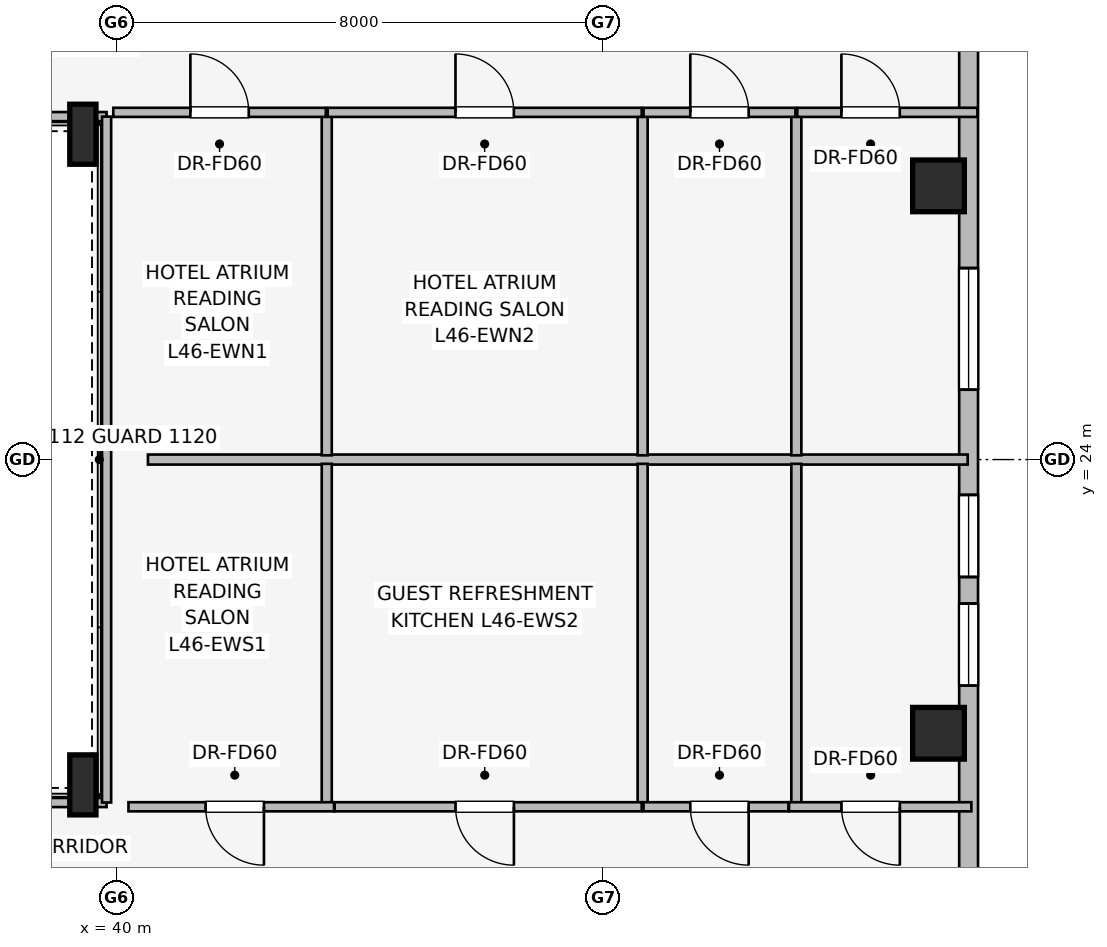
"""IFC4 building model, lengths in metres.
Left out: names, types, materials, properties, quantities, classifications, styles, units other than length and angle.
Written with IfcOpenShell. Run it as: python <this file> out.ifc"""

import sys

from ifc_helpers import new_model, si_unit, direction, frame, frame_2d, origin, origin_2d, place, context, subcontext, project, spatial, rectangle, i_section, extrude, element, fill, save


model = new_model("IFC4")
c1 = context("Model", 3, precision=1e-05, world=origin(), true_north=direction((0.0, 1.0)))
c2 = subcontext(c1, "Body", "Model", "MODEL_VIEW")
j1 = project(units=[si_unit("LENGTHUNIT", "METRE"), si_unit("PLANEANGLEUNIT", "RADIAN")], contexts=[c1])
p1 = place(None, origin())
s1 = spatial("IfcSite", under=j1, at=p1, CompositionType="ELEMENT")
p2 = place(p1, origin())
s2 = spatial("IfcBuilding", under=s1, at=p2, CompositionType="ELEMENT")
p3 = place(p2, frame((0.0, 0.0, 170.55)))
s3 = spatial("IfcBuildingStorey", under=s2, at=p3, CompositionType="ELEMENT", Elevation=170.55)
for number, where, z_axis, x_axis in (
    (1, (53.522, 19.499, 0.0), (0.0, 0.0, 1.0), (1.0, 0.0, 0.0)),
    (2, (53.522, 28.501, 0.0), (0.0, 0.0, 1.0), (1.0, 0.0, 0.0)),
):
    element("IfcColumn", number, at=place(p3, frame(where, z_axis=z_axis, x_axis=x_axis)), inside=s3, PredefinedType="COLUMN", context=c2, shape_type="SweptSolid", body=[
        extrude(rectangle(XDim=0.85, YDim=0.85, at=origin_2d()), origin(), (0.0, 0.0, 1.0), 3.45),
    ])
for number, where, z_axis, x_axis in (
    (3, (39.45, 18.65, 0.0), (0.0, 0.0, 1.0), (1.0, 0.0, 0.0)),
    (4, (39.45, 29.35, 0.0), (0.0, 0.0, 1.0), (1.0, 0.0, 0.0)),
):
    element("IfcColumn", number, at=place(p3, frame(where, z_axis=z_axis, x_axis=x_axis)), inside=s3, PredefinedType="COLUMN", context=c2, shape_type="SweptSolid", body=[
        extrude(i_section(OverallWidth=0.431, OverallDepth=0.987, WebThickness=0.034, FlangeThickness=0.062, at=origin_2d()), origin(), (0.0, 0.0, 1.0), 3.45),
    ])
p4 = place(p3, frame((54.017, 31.502, 0.0), z_axis=(0.0, 0.0, 1.0), x_axis=(0.0, -1.0, 0.0)))
e5 = element("IfcWall", 5, at=p4, inside=s3, PredefinedType="STANDARD", context=c2, shape_type="SweptSolid", body=[
    extrude(rectangle(XDim=15.004, YDim=0.31, at=frame_2d((7.502, 0.0))), origin(), (0.0, 0.0, 1.0), 3.16),
])
p5 = place(p4, frame((4.353, 0.0, 0.75)))
e6 = element("IfcOpeningElement", 6, at=p5, cuts=e5, PredefinedType="OPENING", context=c2, shape_type="SweptSolid", body=[
    extrude(rectangle(XDim=2.0, YDim=1.5, at=frame_2d((1.0, 0.75))), frame((0.0, 0.165, 0.0), z_axis=(0.0, -1.0, 0.0), x_axis=(1.0, 0.0, 0.0)), (0.0, 0.0, 1.0), 0.33),
])
p6 = place(p4, frame((8.083, 0.0, 0.75)))
e7 = element("IfcOpeningElement", 7, at=p6, cuts=e5, PredefinedType="OPENING", context=c2, shape_type="SweptSolid", body=[
    extrude(rectangle(XDim=1.35, YDim=1.45, at=frame_2d((0.675, 0.725))), frame((0.0, 0.165, 0.0), z_axis=(0.0, -1.0, 0.0), x_axis=(1.0, 0.0, 0.0)), (0.0, 0.0, 1.0), 0.33),
])
p7 = place(p4, frame((9.87, 0.0, 0.75)))
e8 = element("IfcOpeningElement", 8, at=p7, cuts=e5, PredefinedType="OPENING", context=c2, shape_type="SweptSolid", body=[
    extrude(rectangle(XDim=1.35, YDim=1.45, at=frame_2d((0.675, 0.725))), frame((0.0, 0.165, 0.0), z_axis=(0.0, -1.0, 0.0), x_axis=(1.0, 0.0, 0.0)), (0.0, 0.0, 1.0), 0.33),
])
p8 = place(p3, frame((27.55, 18.36, 0.0), z_axis=(0.0, 0.0, 1.0), x_axis=(1.0, 0.0, 0.0)))
e9 = element("IfcWall", 9, at=p8, inside=s3, PredefinedType="PARTITIONING", context=c2, shape_type="SweptSolid", body=[
    extrude(rectangle(XDim=12.29, YDim=0.15, at=frame_2d((6.145, 0.0))), origin(), (0.0, 0.0, 1.0), 2.301),
])
p9 = place(p3, frame((39.84, 29.64, 0.0), z_axis=(0.0, 0.0, 1.0), x_axis=(-1.0, 0.0, 0.0)))
e10 = element("IfcWall", 10, at=p9, inside=s3, PredefinedType="PARTITIONING", context=c2, shape_type="SweptSolid", body=[
    extrude(rectangle(XDim=12.2, YDim=0.15, at=frame_2d((6.1, 0.0))), origin(), (0.0, 0.0, 1.0), 2.301),
])
p10 = place(p3, frame((39.84, 18.36, 0.0), z_axis=(0.0, 0.0, 1.0), x_axis=(0.0, 1.0, 0.0)))
e11 = element("IfcWall", 11, at=p10, inside=s3, PredefinedType="PARTITIONING", context=c2, shape_type="SweptSolid", body=[
    extrude(rectangle(XDim=11.28, YDim=0.15, at=frame_2d((5.64, 0.0))), origin(), (0.0, 0.0, 1.0), 3.16),
])
p11 = place(p3, frame((40.52, 24.0, 0.0), z_axis=(0.0, 0.0, 1.0), x_axis=(1.0, 0.0, 0.0)))
e12 = element("IfcWall", 12, at=p11, inside=s3, PredefinedType="PARTITIONING", context=c2, shape_type="SweptSolid", body=[
    extrude(rectangle(XDim=13.482, YDim=0.165, at=frame_2d((6.741, 0.0))), origin(), (0.0, 0.0, 1.0), 3.16),
])
for number, where, z_axis, x_axis in (
    (13, (43.461, 24.07, 0.0), (0.0, 0.0, 1.0), (0.0, 1.0, 0.0)),
    (14, (48.656, 24.07, 0.0), (0.0, 0.0, 1.0), (0.0, 1.0, 0.0)),
    (15, (51.184, 24.07, 0.0), (0.0, 0.0, 1.0), (0.0, 1.0, 0.0)),
):
    element("IfcWall", number, at=place(p3, frame(where, z_axis=z_axis, x_axis=x_axis)), inside=s3, PredefinedType="PARTITIONING", context=c2, shape_type="SweptSolid", body=[
        extrude(rectangle(XDim=5.64, YDim=0.165, at=frame_2d((2.82, 0.0))), origin(), (0.0, 0.0, 1.0), 3.16),
    ])
p12 = place(p3, frame((39.95, 29.71, 0.0), z_axis=(0.0, 0.0, 1.0), x_axis=(1.0, 0.0, 0.0)))
e16 = element("IfcWall", 16, at=p12, inside=s3, PredefinedType="PARTITIONING", context=c2, shape_type="SweptSolid", body=[
    extrude(rectangle(XDim=3.496, YDim=0.15, at=frame_2d((1.748, 0.0))), origin(), (0.0, 0.0, 1.0), 3.16),
])
p13 = place(p12, frame((1.268, 0.0, 0.0)))
e17 = element("IfcOpeningElement", 17, at=p13, cuts=e16, PredefinedType="OPENING", context=c2, shape_type="SweptSolid", body=[
    extrude(rectangle(XDim=0.96, YDim=2.0, at=frame_2d((0.48, 1.0))), frame((0.0, 0.085, 0.0), z_axis=(0.0, -1.0, 0.0), x_axis=(1.0, 0.0, 0.0)), (0.0, 0.0, 1.0), 0.17),
])
p14 = place(p3, frame((43.476, 29.71, 0.0), z_axis=(0.0, 0.0, 1.0), x_axis=(1.0, 0.0, 0.0)))
e18 = element("IfcWall", 18, at=p14, inside=s3, PredefinedType="PARTITIONING", context=c2, shape_type="SweptSolid", body=[
    extrude(rectangle(XDim=5.165, YDim=0.15, at=frame_2d((2.583, 0.0))), origin(), (0.0, 0.0, 1.0), 3.16),
])
p15 = place(p14, frame((2.102, 0.0, 0.0)))
e19 = element("IfcOpeningElement", 19, at=p15, cuts=e18, PredefinedType="OPENING", context=c2, shape_type="SweptSolid", body=[
    extrude(rectangle(XDim=0.96, YDim=2.0, at=frame_2d((0.48, 1.0))), frame((0.0, 0.085, 0.0), z_axis=(0.0, -1.0, 0.0), x_axis=(1.0, 0.0, 0.0)), (0.0, 0.0, 1.0), 0.17),
])
p16 = place(p3, frame((48.671, 29.71, 0.0), z_axis=(0.0, 0.0, 1.0), x_axis=(1.0, 0.0, 0.0)))
e20 = element("IfcWall", 20, at=p16, inside=s3, PredefinedType="PARTITIONING", context=c2, shape_type="SweptSolid", body=[
    extrude(rectangle(XDim=2.498, YDim=0.15, at=frame_2d((1.249, 0.0))), origin(), (0.0, 0.0, 1.0), 3.16),
])
p17 = place(p16, frame((0.769, 0.0, 0.0)))
e21 = element("IfcOpeningElement", 21, at=p17, cuts=e20, PredefinedType="OPENING", context=c2, shape_type="SweptSolid", body=[
    extrude(rectangle(XDim=0.96, YDim=2.0, at=frame_2d((0.48, 1.0))), frame((0.0, 0.085, 0.0), z_axis=(0.0, -1.0, 0.0), x_axis=(1.0, 0.0, 0.0)), (0.0, 0.0, 1.0), 0.17),
])
p18 = place(p3, frame((51.199, 29.71, 0.0), z_axis=(0.0, 0.0, 1.0), x_axis=(1.0, 0.0, 0.0)))
e22 = element("IfcWall", 22, at=p18, inside=s3, PredefinedType="PARTITIONING", context=c2, shape_type="SweptSolid", body=[
    extrude(rectangle(XDim=2.963, YDim=0.15, at=frame_2d((1.481, 0.0))), origin(), (0.0, 0.0, 1.0), 3.16),
])
p19 = place(p18, frame((0.726, 0.0, 0.0)))
e23 = element("IfcOpeningElement", 23, at=p19, cuts=e22, PredefinedType="OPENING", context=c2, shape_type="SweptSolid", body=[
    extrude(rectangle(XDim=0.96, YDim=2.0, at=frame_2d((0.48, 1.0))), frame((0.0, 0.085, 0.0), z_axis=(0.0, -1.0, 0.0), x_axis=(1.0, 0.0, 0.0)), (0.0, 0.0, 1.0), 0.17),
])
for number, where, z_axis, x_axis in (
    (24, (43.461, 18.29, 0.0), (0.0, 0.0, 1.0), (0.0, 1.0, 0.0)),
    (25, (48.656, 18.29, 0.0), (0.0, 0.0, 1.0), (0.0, 1.0, 0.0)),
    (26, (51.184, 18.29, 0.0), (0.0, 0.0, 1.0), (0.0, 1.0, 0.0)),
):
    element("IfcWall", number, at=place(p3, frame(where, z_axis=z_axis, x_axis=x_axis)), inside=s3, PredefinedType="PARTITIONING", context=c2, shape_type="SweptSolid", body=[
        extrude(rectangle(XDim=5.64, YDim=0.165, at=frame_2d((2.82, 0.0))), origin(), (0.0, 0.0, 1.0), 3.16),
    ])
p20 = place(p3, frame((43.581, 18.29, 0.0), z_axis=(0.0, 0.0, 1.0), x_axis=(-1.0, 0.0, 0.0)))
e27 = element("IfcWall", 27, at=p20, inside=s3, PredefinedType="PARTITIONING", context=c2, shape_type="SweptSolid", body=[
    extrude(rectangle(XDim=3.381, YDim=0.15, at=frame_2d((1.69, 0.0))), origin(), (0.0, 0.0, 1.0), 3.16),
])
p21 = place(p20, frame((1.153, 0.0, 0.0)))
e28 = element("IfcOpeningElement", 28, at=p21, cuts=e27, PredefinedType="OPENING", context=c2, shape_type="SweptSolid", body=[
    extrude(rectangle(XDim=0.96, YDim=2.0, at=frame_2d((0.48, 1.0))), frame((0.0, 0.085, 0.0), z_axis=(0.0, -1.0, 0.0), x_axis=(1.0, 0.0, 0.0)), (0.0, 0.0, 1.0), 0.17),
])
p22 = place(p3, frame((48.641, 18.29, 0.0), z_axis=(0.0, 0.0, 1.0), x_axis=(-1.0, 0.0, 0.0)))
e29 = element("IfcWall", 29, at=p22, inside=s3, PredefinedType="PARTITIONING", context=c2, shape_type="SweptSolid", body=[
    extrude(rectangle(XDim=5.05, YDim=0.15, at=frame_2d((2.525, 0.0))), origin(), (0.0, 0.0, 1.0), 3.16),
])
p23 = place(p22, frame((2.102, 0.0, 0.0)))
e30 = element("IfcOpeningElement", 30, at=p23, cuts=e29, PredefinedType="OPENING", context=c2, shape_type="SweptSolid", body=[
    extrude(rectangle(XDim=0.96, YDim=2.0, at=frame_2d((0.48, 1.0))), frame((0.0, 0.085, 0.0), z_axis=(0.0, -1.0, 0.0), x_axis=(1.0, 0.0, 0.0)), (0.0, 0.0, 1.0), 0.17),
])
p24 = place(p3, frame((51.054, 18.29, 0.0), z_axis=(0.0, 0.0, 1.0), x_axis=(-1.0, 0.0, 0.0)))
e31 = element("IfcWall", 31, at=p24, inside=s3, PredefinedType="PARTITIONING", context=c2, shape_type="SweptSolid", body=[
    extrude(rectangle(XDim=2.383, YDim=0.15, at=frame_2d((1.191, 0.0))), origin(), (0.0, 0.0, 1.0), 3.16),
])
p25 = place(p24, frame((0.654, 0.0, 0.0)))
e32 = element("IfcOpeningElement", 32, at=p25, cuts=e31, PredefinedType="OPENING", context=c2, shape_type="SweptSolid", body=[
    extrude(rectangle(XDim=0.96, YDim=2.0, at=frame_2d((0.48, 1.0))), frame((0.0, 0.085, 0.0), z_axis=(0.0, -1.0, 0.0), x_axis=(1.0, 0.0, 0.0)), (0.0, 0.0, 1.0), 0.17),
])
p26 = place(p3, frame((54.062, 18.29, 0.0), z_axis=(0.0, 0.0, 1.0), x_axis=(-1.0, 0.0, 0.0)))
e33 = element("IfcWall", 33, at=p26, inside=s3, PredefinedType="PARTITIONING", context=c2, shape_type="SweptSolid", body=[
    extrude(rectangle(XDim=2.998, YDim=0.15, at=frame_2d((1.499, 0.0))), origin(), (0.0, 0.0, 1.0), 3.16),
])
p27 = place(p26, frame((1.176, 0.0, 0.0)))
e34 = element("IfcOpeningElement", 34, at=p27, cuts=e33, PredefinedType="OPENING", context=c2, shape_type="SweptSolid", body=[
    extrude(rectangle(XDim=0.96, YDim=2.0, at=frame_2d((0.48, 1.0))), frame((0.0, 0.085, 0.0), z_axis=(0.0, -1.0, 0.0), x_axis=(1.0, 0.0, 0.0)), (0.0, 0.0, 1.0), 0.17),
])
p28 = place(p5, origin())
e35 = element("IfcWindow", 35, at=p28, inside=s3, PartitioningType="SINGLE_PANEL", PredefinedType="WINDOW", context=c2, shape_type="SweptSolid", body=[
    extrude(rectangle(XDim=2.0, YDim=1.5, at=frame_2d((1.0, 0.75))), frame((0.0, 0.03, 0.0), z_axis=(0.0, -1.0, 0.0), x_axis=(1.0, 0.0, 0.0)), (0.0, 0.0, 1.0), 0.06),
])
fill(e6, e35)
p29 = place(p6, origin())
e36 = element("IfcWindow", 36, at=p29, inside=s3, PartitioningType="SINGLE_PANEL", PredefinedType="WINDOW", context=c2, shape_type="SweptSolid", body=[
    extrude(rectangle(XDim=1.35, YDim=1.45, at=frame_2d((0.675, 0.725))), frame((0.0, 0.03, 0.0), z_axis=(0.0, -1.0, 0.0), x_axis=(1.0, 0.0, 0.0)), (0.0, 0.0, 1.0), 0.06),
])
fill(e7, e36)
p30 = place(p7, origin())
e37 = element("IfcWindow", 37, at=p30, inside=s3, PartitioningType="SINGLE_PANEL", PredefinedType="WINDOW", context=c2, shape_type="SweptSolid", body=[
    extrude(rectangle(XDim=1.35, YDim=1.45, at=frame_2d((0.675, 0.725))), frame((0.0, 0.03, 0.0), z_axis=(0.0, -1.0, 0.0), x_axis=(1.0, 0.0, 0.0)), (0.0, 0.0, 1.0), 0.06),
])
fill(e8, e37)
p31 = place(p13, origin())
e38 = element("IfcDoor", 38, at=p31, inside=s3, OperationType="SINGLE_SWING_LEFT", PredefinedType="DOOR", context=c2, shape_type="SweptSolid", body=[
    extrude(rectangle(XDim=0.96, YDim=2.0, at=frame_2d((0.48, 1.0))), frame((0.0, 0.025, 0.0), z_axis=(0.0, -1.0, 0.0), x_axis=(1.0, 0.0, 0.0)), (0.0, 0.0, 1.0), 0.05),
])
fill(e17, e38)
p32 = place(p15, origin())
e39 = element("IfcDoor", 39, at=p32, inside=s3, OperationType="SINGLE_SWING_LEFT", PredefinedType="DOOR", context=c2, shape_type="SweptSolid", body=[
    extrude(rectangle(XDim=0.96, YDim=2.0, at=frame_2d((0.48, 1.0))), frame((0.0, 0.025, 0.0), z_axis=(0.0, -1.0, 0.0), x_axis=(1.0, 0.0, 0.0)), (0.0, 0.0, 1.0), 0.05),
])
fill(e19, e39)
p33 = place(p17, origin())
e40 = element("IfcDoor", 40, at=p33, inside=s3, OperationType="SINGLE_SWING_LEFT", PredefinedType="DOOR", context=c2, shape_type="SweptSolid", body=[
    extrude(rectangle(XDim=0.96, YDim=2.0, at=frame_2d((0.48, 1.0))), frame((0.0, 0.025, 0.0), z_axis=(0.0, -1.0, 0.0), x_axis=(1.0, 0.0, 0.0)), (0.0, 0.0, 1.0), 0.05),
])
fill(e21, e40)
p34 = place(p19, origin())
e41 = element("IfcDoor", 41, at=p34, inside=s3, OperationType="SINGLE_SWING_LEFT", PredefinedType="DOOR", context=c2, shape_type="SweptSolid", body=[
    extrude(rectangle(XDim=0.96, YDim=2.0, at=frame_2d((0.48, 1.0))), frame((0.0, 0.025, 0.0), z_axis=(0.0, -1.0, 0.0), x_axis=(1.0, 0.0, 0.0)), (0.0, 0.0, 1.0), 0.05),
])
fill(e23, e41)
p35 = place(p21, origin())
e42 = element("IfcDoor", 42, at=p35, inside=s3, OperationType="SINGLE_SWING_LEFT", PredefinedType="DOOR", context=c2, shape_type="SweptSolid", body=[
    extrude(rectangle(XDim=0.96, YDim=2.0, at=frame_2d((0.48, 1.0))), frame((0.0, 0.025, 0.0), z_axis=(0.0, -1.0, 0.0), x_axis=(1.0, 0.0, 0.0)), (0.0, 0.0, 1.0), 0.05),
])
fill(e28, e42)
p36 = place(p23, origin())
e43 = element("IfcDoor", 43, at=p36, inside=s3, OperationType="SINGLE_SWING_LEFT", PredefinedType="DOOR", context=c2, shape_type="SweptSolid", body=[
    extrude(rectangle(XDim=0.96, YDim=2.0, at=frame_2d((0.48, 1.0))), frame((0.0, 0.025, 0.0), z_axis=(0.0, -1.0, 0.0), x_axis=(1.0, 0.0, 0.0)), (0.0, 0.0, 1.0), 0.05),
])
fill(e30, e43)
p37 = place(p25, origin())
e44 = element("IfcDoor", 44, at=p37, inside=s3, OperationType="SINGLE_SWING_LEFT", PredefinedType="DOOR", context=c2, shape_type="SweptSolid", body=[
    extrude(rectangle(XDim=0.96, YDim=2.0, at=frame_2d((0.48, 1.0))), frame((0.0, 0.025, 0.0), z_axis=(0.0, -1.0, 0.0), x_axis=(1.0, 0.0, 0.0)), (0.0, 0.0, 1.0), 0.05),
])
fill(e32, e44)
p38 = place(p27, origin())
e45 = element("IfcDoor", 45, at=p38, inside=s3, OperationType="SINGLE_SWING_LEFT", PredefinedType="DOOR", context=c2, shape_type="SweptSolid", body=[
    extrude(rectangle(XDim=0.96, YDim=2.0, at=frame_2d((0.48, 1.0))), frame((0.0, 0.025, 0.0), z_axis=(0.0, -1.0, 0.0), x_axis=(1.0, 0.0, 0.0)), (0.0, 0.0, 1.0), 0.05),
])
fill(e34, e45)
save(model, sys.argv[1])
